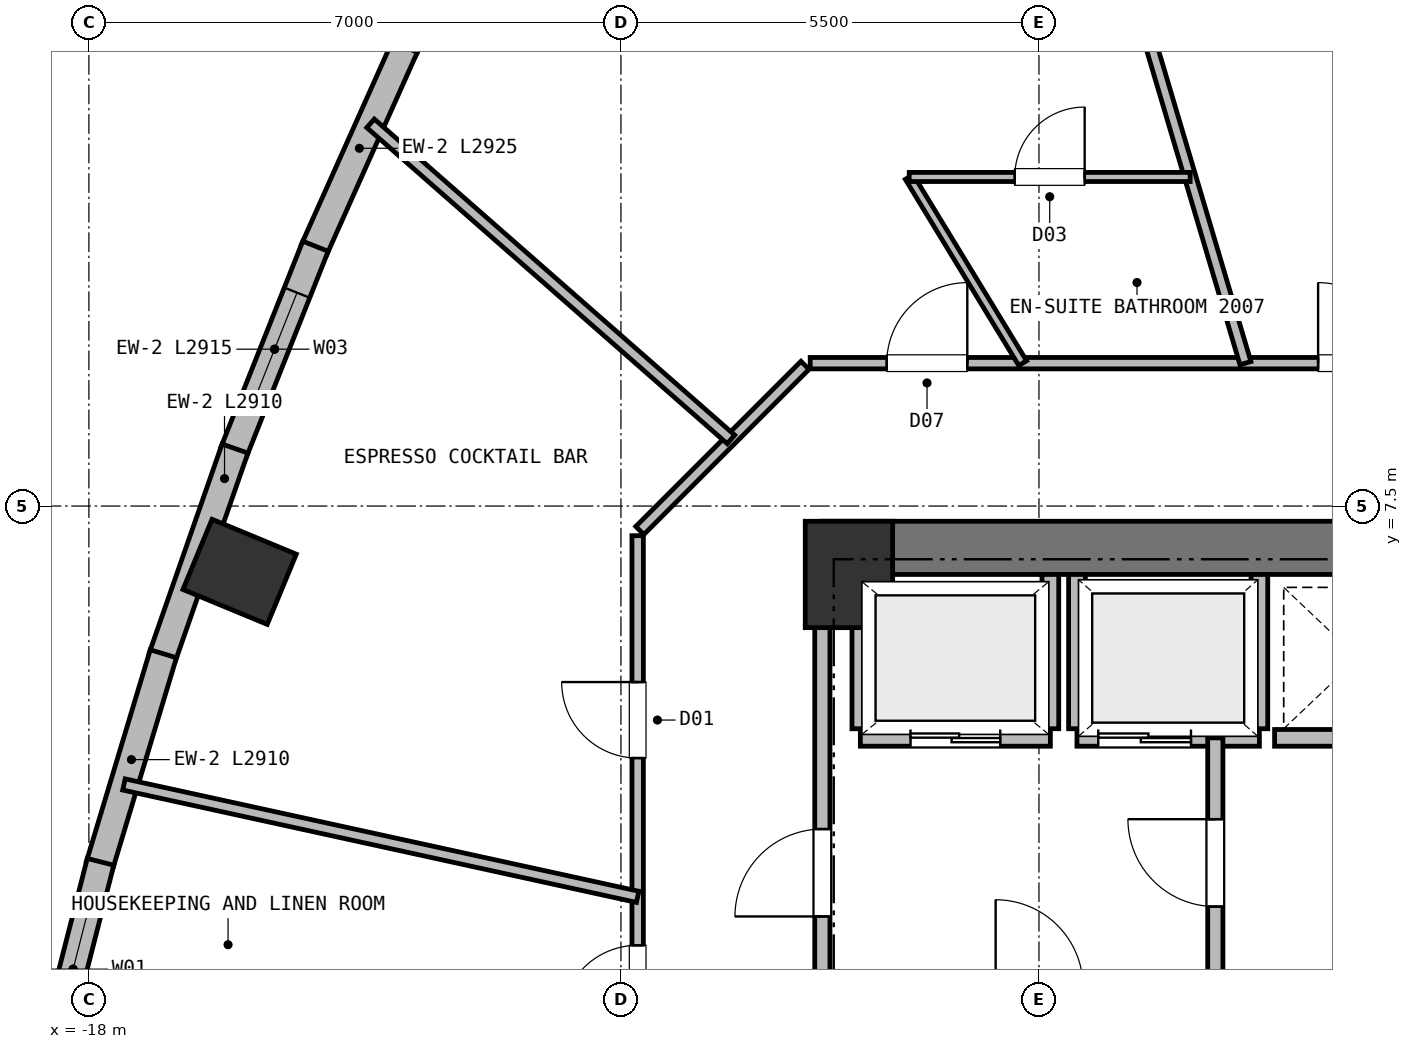
"""IFC4 building model, lengths in metres.
Left out: names, types, materials, properties, quantities, classifications, styles, units other than length and angle.
Written with IfcOpenShell. Run it as: python <this file> out.ifc"""

import sys

from ifc_helpers import new_model, si_unit, direction, frame, frame_2d, origin, origin_2d, place, context, subcontext, project, spatial, rectangle, extrude, element, fill, save


model = new_model("IFC4")
c1 = context("Model", 3, precision=1e-05, world=origin(), true_north=direction((0.0, 1.0)))
c2 = subcontext(c1, "Body", "Model", "MODEL_VIEW")
j1 = project(units=[si_unit("LENGTHUNIT", "METRE"), si_unit("PLANEANGLEUNIT", "RADIAN")], contexts=[c1])
p1 = place(None, origin())
s1 = spatial("IfcSite", under=j1, at=p1, CompositionType="ELEMENT")
p2 = place(p1, origin())
s2 = spatial("IfcBuilding", under=s1, at=p2, CompositionType="ELEMENT")
p3 = place(p2, frame((0.0, 0.0, 71.75)))
s3 = spatial("IfcBuildingStorey", under=s2, at=p3, CompositionType="ELEMENT", Elevation=71.75)
p4 = place(p3, frame((-8.0, 6.6, 0.0), z_axis=(0.0, 0.0, 1.0), x_axis=(1.0, 0.0, 0.0)))
e1 = element("IfcColumn", 1, at=p4, inside=s3, PredefinedType="COLUMN", context=c2, shape_type="SweptSolid", body=[
    extrude(rectangle(XDim=1.15, YDim=1.4, at=origin_2d()), origin(), (0.0, 0.0, 1.0), 3.75),
])
p5 = place(p3, frame((-8.35, 6.95, 0.0), z_axis=(0.0, 0.0, 1.0), x_axis=(1.0, 0.0, 0.0)))
e2 = element("IfcWall", 2, at=p5, inside=s3, PredefinedType="SHEAR", context=c2, shape_type="SweptSolid", body=[
    extrude(rectangle(XDim=16.7, YDim=0.7, at=frame_2d((8.35, 0.0))), origin(), (0.0, 0.0, 1.0), 3.5),
])
p6 = place(p3, frame((-16.017, 6.635, 0.0), z_axis=(0.0, 0.0, 1.0), x_axis=(0.382683432365, 0.923879532511, 0.0)))
e3 = element("IfcColumn", 3, at=p6, inside=s3, PredefinedType="COLUMN", context=c2, shape_type="SweptSolid", body=[
    extrude(rectangle(XDim=1.0, YDim=1.2, at=origin_2d()), origin(), (0.0, 0.0, 1.0), 3.75),
])
p7 = place(p3, frame((-13.865, 13.498, 0.0), z_axis=(0.0, 0.0, 1.0), x_axis=(0.446383231338, 0.894841891499, 0.0)))
e4 = element("IfcWall", 4, at=p7, inside=s3, PredefinedType="SOLIDWALL", context=c2, shape_type="SweptSolid", body=[
    extrude(rectangle(XDim=2.941, YDim=0.36, at=frame_2d((1.47, 0.0))), origin(), (0.0, 0.0, 1.0), 3.5),
])
p8 = place(p7, frame((0.67, 0.0, 0.72)))
e5 = element("IfcOpeningElement", 5, at=p8, cuts=e4, PredefinedType="OPENING", context=c2, shape_type="SweptSolid", body=[
    extrude(rectangle(XDim=1.6, YDim=1.88, at=frame_2d((0.8, 0.94))), frame((0.0, 0.19, 0.0), z_axis=(0.0, -1.0, 0.0), x_axis=(1.0, 0.0, 0.0)), (0.0, 0.0, 1.0), 0.38),
])
p9 = place(p3, frame((-15.038, 10.873, 0.0), z_axis=(0.0, 0.0, 1.0), x_axis=(0.408305664589, 0.912845268523, 0.0)))
e6 = element("IfcWall", 6, at=p9, inside=s3, PredefinedType="SOLIDWALL", context=c2, shape_type="SweptSolid", body=[
    extrude(rectangle(XDim=2.925, YDim=0.36, at=frame_2d((1.462, 0.0))), origin(), (0.0, 0.0, 1.0), 3.5),
])
p10 = place(p3, frame((-16.095, 8.21, 0.0), z_axis=(0.0, 0.0, 1.0), x_axis=(0.369223403916, 0.929340668432, 0.0)))
e7 = element("IfcWall", 7, at=p10, inside=s3, PredefinedType="SOLIDWALL", context=c2, shape_type="SweptSolid", body=[
    extrude(rectangle(XDim=2.915, YDim=0.36, at=frame_2d((1.458, 0.0))), origin(), (0.0, 0.0, 1.0), 3.5),
])
p11 = place(p10, frame((0.657, 0.0, 0.72)))
e8 = element("IfcOpeningElement", 8, at=p11, cuts=e7, PredefinedType="OPENING", context=c2, shape_type="SweptSolid", body=[
    extrude(rectangle(XDim=1.6, YDim=1.88, at=frame_2d((0.8, 0.94))), frame((0.0, 0.19, 0.0), z_axis=(0.0, -1.0, 0.0), x_axis=(1.0, 0.0, 0.0)), (0.0, 0.0, 1.0), 0.38),
])
p12 = place(p3, frame((-17.036, 5.509, 0.0), z_axis=(0.0, 0.0, 1.0), x_axis=(0.329262553332, 0.944238407911, 0.0)))
e9 = element("IfcWall", 9, at=p12, inside=s3, PredefinedType="SOLIDWALL", context=c2, shape_type="SweptSolid", body=[
    extrude(rectangle(XDim=2.91, YDim=0.36, at=frame_2d((1.455, 0.0))), origin(), (0.0, 0.0, 1.0), 3.5),
])
p13 = place(p3, frame((-17.86, 2.771, 0.0), z_axis=(0.0, 0.0, 1.0), x_axis=(0.288579409527, 0.95745596473, 0.0)))
e10 = element("IfcWall", 10, at=p13, inside=s3, PredefinedType="SOLIDWALL", context=c2, shape_type="SweptSolid", body=[
    extrude(rectangle(XDim=2.909, YDim=0.36, at=frame_2d((1.455, 0.0))), origin(), (0.0, 0.0, 1.0), 3.5),
])
p14 = place(p3, frame((-18.568, -0.005, 0.0), z_axis=(0.0, 0.0, 1.0), x_axis=(0.247577302221, 0.968868143467, 0.0)))
e11 = element("IfcWall", 11, at=p14, inside=s3, PredefinedType="SOLIDWALL", context=c2, shape_type="SweptSolid", body=[
    extrude(rectangle(XDim=2.915, YDim=0.36, at=frame_2d((1.458, 0.0))), origin(), (0.0, 0.0, 1.0), 3.5),
])
p15 = place(p14, frame((0.657, 0.0, 0.72)))
e12 = element("IfcOpeningElement", 12, at=p15, cuts=e11, PredefinedType="OPENING", context=c2, shape_type="SweptSolid", body=[
    extrude(rectangle(XDim=1.6, YDim=1.88, at=frame_2d((0.8, 0.94))), frame((0.0, 0.19, 0.0), z_axis=(0.0, -1.0, 0.0), x_axis=(1.0, 0.0, 0.0)), (0.0, 0.0, 1.0), 0.38),
])
p16 = place(p3, frame((-7.85, 4.45, 0.0), z_axis=(0.0, 0.0, 1.0), x_axis=(1.0, 0.0, 0.0)))
e13 = element("IfcWall", 13, at=p16, inside=s3, PredefinedType="PARTITIONING", context=c2, shape_type="SweptSolid", body=[
    extrude(rectangle(XDim=2.5, YDim=0.22, at=frame_2d((1.25, 0.0))), origin(), (0.0, 0.0, 1.0), 3.5),
])
p17 = place(p16, frame((0.66, 0.0, 0.0)))
e14 = element("IfcOpeningElement", 14, at=p17, cuts=e13, PredefinedType="OPENING", context=c2, shape_type="SweptSolid", body=[
    extrude(rectangle(XDim=1.18, YDim=2.15, at=frame_2d((0.59, 1.075))), frame((0.0, 0.12, 0.0), z_axis=(0.0, -1.0, 0.0), x_axis=(1.0, 0.0, 0.0)), (0.0, 0.0, 1.0), 0.24),
])
p18 = place(p3, frame((-7.85, 4.57, 0.0), z_axis=(0.0, 0.0, 1.0), x_axis=(0.0, 1.0, 0.0)))
e15 = element("IfcWall", 15, at=p18, inside=s3, PredefinedType="PARTITIONING", context=c2, shape_type="SweptSolid", body=[
    extrude(rectangle(XDim=2.03, YDim=0.22, at=frame_2d((1.015, 0.0))), origin(), (0.0, 0.0, 1.0), 3.08),
])
p19 = place(p3, frame((-5.35, 4.57, 0.0), z_axis=(0.0, 0.0, 1.0), x_axis=(0.0, 1.0, 0.0)))
e16 = element("IfcWall", 16, at=p19, inside=s3, PredefinedType="PARTITIONING", context=c2, shape_type="SweptSolid", body=[
    extrude(rectangle(XDim=2.03, YDim=0.22, at=frame_2d((1.015, 0.0))), origin(), (0.0, 0.0, 1.0), 3.5),
])
p20 = place(p3, frame((-5.0, 4.45, 0.0), z_axis=(0.0, 0.0, 1.0), x_axis=(1.0, 0.0, 0.0)))
e17 = element("IfcWall", 17, at=p20, inside=s3, PredefinedType="PARTITIONING", context=c2, shape_type="SweptSolid", body=[
    extrude(rectangle(XDim=2.4, YDim=0.22, at=frame_2d((1.2, 0.0))), origin(), (0.0, 0.0, 1.0), 3.5),
])
p21 = place(p20, frame((0.28, 0.0, 0.0)))
e18 = element("IfcOpeningElement", 18, at=p21, cuts=e17, PredefinedType="OPENING", context=c2, shape_type="SweptSolid", body=[
    extrude(rectangle(XDim=1.22, YDim=2.15, at=frame_2d((0.61, 1.075))), frame((0.0, 0.12, 0.0), z_axis=(0.0, -1.0, 0.0), x_axis=(1.0, 0.0, 0.0)), (0.0, 0.0, 1.0), 0.24),
])
for number, where, z_axis, x_axis in (
    (19, (-5.0, 4.57, 0.0), (0.0, 0.0, 1.0), (0.0, 1.0, 0.0)),
    (20, (-2.6, 4.57, 0.0), (0.0, 0.0, 1.0), (0.0, 1.0, 0.0)),
):
    element("IfcWall", number, at=place(p3, frame(where, z_axis=z_axis, x_axis=x_axis)), inside=s3, PredefinedType="PARTITIONING", context=c2, shape_type="SweptSolid", body=[
        extrude(rectangle(XDim=2.03, YDim=0.22, at=frame_2d((1.015, 0.0))), origin(), (0.0, 0.0, 1.0), 3.5),
    ])
p22 = place(p3, frame((-2.4, 4.45, 0.0), z_axis=(0.0, 0.0, 1.0), x_axis=(1.0, 0.0, 0.0)))
e21 = element("IfcWall", 21, at=p22, inside=s3, PredefinedType="PARTITIONING", context=c2, shape_type="SweptSolid", body=[
    extrude(rectangle(XDim=2.2, YDim=0.22, at=frame_2d((1.1, 0.0))), origin(), (0.0, 0.0, 1.0), 3.5),
])
p23 = place(p3, frame((-3.18, 1.15, 0.0), z_axis=(0.0, 0.0, 1.0), x_axis=(0.0, 1.0, 0.0)))
e22 = element("IfcWall", 22, at=p23, inside=s3, PredefinedType="PARTITIONING", context=c2, shape_type="SweptSolid", body=[
    extrude(rectangle(XDim=3.3, YDim=0.2, at=frame_2d((1.65, 0.0))), origin(), (0.0, 0.0, 1.0), 3.5),
])
p24 = place(p23, frame((1.08, 0.0, 0.0)))
e23 = element("IfcOpeningElement", 23, at=p24, cuts=e22, PredefinedType="OPENING", context=c2, shape_type="SweptSolid", body=[
    extrude(rectangle(XDim=1.15, YDim=2.15, at=frame_2d((0.575, 1.075))), frame((0.0, 0.11, 0.0), z_axis=(0.0, -1.0, 0.0), x_axis=(1.0, 0.0, 0.0)), (0.0, 0.0, 1.0), 0.22),
])
p25 = place(p3, frame((-8.35, 1.15, 0.0), z_axis=(0.0, 0.0, 1.0), x_axis=(0.0, 1.0, 0.0)))
e24 = element("IfcWall", 24, at=p25, inside=s3, PredefinedType="PARTITIONING", context=c2, shape_type="SweptSolid", body=[
    extrude(rectangle(XDim=5.4, YDim=0.2, at=frame_2d((2.7, 0.0))), origin(), (0.0, 0.0, 1.0), 3.5),
])
p26 = place(p25, frame((0.95, 0.0, 0.0)))
e25 = element("IfcOpeningElement", 25, at=p26, cuts=e24, PredefinedType="OPENING", context=c2, shape_type="SweptSolid", body=[
    extrude(rectangle(XDim=1.15, YDim=2.15, at=frame_2d((0.575, 1.075))), frame((0.0, 0.11, 0.0), z_axis=(0.0, -1.0, 0.0), x_axis=(1.0, 0.0, 0.0)), (0.0, 0.0, 1.0), 0.22),
])
p27 = place(p3, frame((-8.51, 9.38, 0.0), z_axis=(0.0, 0.0, 1.0), x_axis=(1.0, 0.0, 0.0)))
e26 = element("IfcWall", 26, at=p27, inside=s3, PredefinedType="PARTITIONING", context=c2, shape_type="SweptSolid", body=[
    extrude(rectangle(XDim=17.02, YDim=0.15, at=frame_2d((8.51, 0.0))), origin(), (0.0, 0.0, 1.0), 3.5),
])
p28 = place(p27, frame((12.398, 0.0, 0.0)))
e27 = element("IfcOpeningElement", 27, at=p28, cuts=e26, PredefinedType="OPENING", context=c2, shape_type="SweptSolid", body=[
    extrude(rectangle(XDim=1.06, YDim=2.15, at=frame_2d((0.53, 1.075))), frame((0.0, 0.085, 0.0), z_axis=(0.0, -1.0, 0.0), x_axis=(1.0, 0.0, 0.0)), (0.0, 0.0, 1.0), 0.17),
])
p29 = place(p27, frame((1.007, 0.0, 0.0)))
e28 = element("IfcOpeningElement", 28, at=p29, cuts=e26, PredefinedType="OPENING", context=c2, shape_type="SweptSolid", body=[
    extrude(rectangle(XDim=1.06, YDim=2.15, at=frame_2d((0.53, 1.075))), frame((0.0, 0.085, 0.0), z_axis=(0.0, -1.0, 0.0), x_axis=(1.0, 0.0, 0.0)), (0.0, 0.0, 1.0), 0.17),
])
p30 = place(p27, frame((6.683, 0.0, 0.0)))
e29 = element("IfcOpeningElement", 29, at=p30, cuts=e26, PredefinedType="OPENING", context=c2, shape_type="SweptSolid", body=[
    extrude(rectangle(XDim=1.06, YDim=2.15, at=frame_2d((0.53, 1.075))), frame((0.0, 0.085, 0.0), z_axis=(0.0, -1.0, 0.0), x_axis=(1.0, 0.0, 0.0)), (0.0, 0.0, 1.0), 0.17),
])
p31 = place(p3, frame((-10.752, 7.178, 0.0), z_axis=(0.0, 0.0, 1.0), x_axis=(0.707067066127, 0.707146494016, 0.0)))
e30 = element("IfcWall", 30, at=p31, inside=s3, PredefinedType="PARTITIONING", context=c2, shape_type="SweptSolid", body=[
    extrude(rectangle(XDim=3.074, YDim=0.15, at=frame_2d((1.537, 0.0))), origin(), (0.0, 0.0, 1.0), 3.5),
])
p32 = place(p3, frame((-10.78, -7.11, 0.0), z_axis=(0.0, 0.0, 1.0), x_axis=(0.0, 1.0, 0.0)))
e31 = element("IfcWall", 31, at=p32, inside=s3, PredefinedType="PARTITIONING", context=c2, shape_type="SweptSolid", body=[
    extrude(rectangle(XDim=14.22, YDim=0.15, at=frame_2d((7.11, 0.0))), origin(), (0.0, 0.0, 1.0), 3.12),
])
p33 = place(p32, frame((5.471, 0.0, 0.0)))
e32 = element("IfcOpeningElement", 32, at=p33, cuts=e31, PredefinedType="OPENING", context=c2, shape_type="SweptSolid", body=[
    extrude(rectangle(XDim=0.95, YDim=2.1, at=frame_2d((0.475, 1.05))), frame((0.0, 0.085, 0.0), z_axis=(0.0, -1.0, 0.0), x_axis=(1.0, 0.0, 0.0)), (0.0, 0.0, 1.0), 0.17),
])
p34 = place(p32, frame((7.83, 0.0, 0.0)))
e33 = element("IfcOpeningElement", 33, at=p34, cuts=e31, PredefinedType="OPENING", context=c2, shape_type="SweptSolid", body=[
    extrude(rectangle(XDim=1.0, YDim=2.15, at=frame_2d((0.5, 1.075))), frame((0.0, 0.085, 0.0), z_axis=(0.0, -1.0, 0.0), x_axis=(1.0, 0.0, 0.0)), (0.0, 0.0, 1.0), 0.17),
])
p35 = place(p32, frame((11.294, 0.0, 0.0)))
e34 = element("IfcOpeningElement", 34, at=p35, cuts=e31, PredefinedType="OPENING", context=c2, shape_type="SweptSolid", body=[
    extrude(rectangle(XDim=1.0, YDim=2.15, at=frame_2d((0.5, 1.075))), frame((0.0, 0.085, 0.0), z_axis=(0.0, -1.0, 0.0), x_axis=(1.0, 0.0, 0.0)), (0.0, 0.0, 1.0), 0.17),
])
p36 = place(p32, frame((0.14, 0.0, 0.0)))
e35 = element("IfcOpeningElement", 35, at=p36, cuts=e31, PredefinedType="OPENING", context=c2, shape_type="SweptSolid", body=[
    extrude(rectangle(XDim=1.06, YDim=2.15, at=frame_2d((0.53, 1.075))), frame((0.0, 0.085, 0.0), z_axis=(0.0, -1.0, 0.0), x_axis=(1.0, 0.0, 0.0)), (0.0, 0.0, 1.0), 0.17),
])
p37 = place(p3, frame((-2.783, 9.38, 0.0), z_axis=(0.0, 0.0, 1.0), x_axis=(-0.284496959379, 0.958676942512, 0.0)))
e36 = element("IfcWall", 36, at=p37, inside=s3, PredefinedType="PARTITIONING", context=c2, shape_type="SweptSolid", body=[
    extrude(rectangle(XDim=15.5, YDim=0.15, at=frame_2d((7.75, 0.0))), origin(), (0.0, 0.0, 1.0), 3.5),
])
p38 = place(p3, frame((-7.207, 11.83, 0.0), z_axis=(0.0, 0.0, 1.0), x_axis=(0.520203390889, -0.854042406504, 0.0)))
e37 = element("IfcWall", 37, at=p38, inside=s3, PredefinedType="PARTITIONING", context=c2, shape_type="SweptSolid", body=[
    extrude(rectangle(XDim=2.869, YDim=0.12, at=frame_2d((1.435, 0.0))), origin(), (0.0, 0.0, 1.0), 3.5),
])
p39 = place(p3, frame((-7.207, 11.83, 0.0), z_axis=(0.0, 0.0, 1.0), x_axis=(1.0, 0.0, 0.0)))
e38 = element("IfcWall", 38, at=p39, inside=s3, PredefinedType="PARTITIONING", context=c2, shape_type="SweptSolid", body=[
    extrude(rectangle(XDim=3.696, YDim=0.12, at=frame_2d((1.848, 0.0))), origin(), (0.0, 0.0, 1.0), 3.5),
])
p40 = place(p39, frame((1.388, 0.0, 0.0)))
e39 = element("IfcOpeningElement", 39, at=p40, cuts=e38, PredefinedType="OPENING", context=c2, shape_type="SweptSolid", body=[
    extrude(rectangle(XDim=0.92, YDim=2.1, at=frame_2d((0.46, 1.05))), frame((0.0, 0.07, 0.0), z_axis=(0.0, -1.0, 0.0), x_axis=(1.0, 0.0, 0.0)), (0.0, 0.0, 1.0), 0.14),
])
p41 = place(p3, frame((-9.552, 8.377, 0.0), z_axis=(0.0, 0.0, 1.0), x_axis=(-0.751832839007, 0.659353761034, 0.0)))
e40 = element("IfcWall", 40, at=p41, inside=s3, PredefinedType="PARTITIONING", context=c2, shape_type="SweptSolid", body=[
    extrude(rectangle(XDim=6.307, YDim=0.15, at=frame_2d((3.153, 0.0))), origin(), (0.0, 0.0, 1.0), 3.5),
])
p42 = place(p3, frame((-10.78, 2.358, 0.0), z_axis=(0.0, 0.0, 1.0), x_axis=(-0.97689172926, 0.213734763911, 0.0)))
e41 = element("IfcWall", 41, at=p42, inside=s3, PredefinedType="PARTITIONING", context=c2, shape_type="SweptSolid", body=[
    extrude(rectangle(XDim=6.919, YDim=0.15, at=frame_2d((3.459, 0.0))), origin(), (0.0, 0.0, 1.0), 3.5),
])
p43 = place(p11, origin())
e42 = element("IfcWindow", 42, at=p43, inside=s3, PartitioningType="SINGLE_PANEL", PredefinedType="WINDOW", context=c2, shape_type="SweptSolid", body=[
    extrude(rectangle(XDim=1.6, YDim=1.88, at=frame_2d((0.8, 0.94))), frame((0.0, 0.03, 0.0), z_axis=(0.0, -1.0, 0.0), x_axis=(1.0, 0.0, 0.0)), (0.0, 0.0, 1.0), 0.06),
])
fill(e8, e42)
p44 = place(p15, origin())
e43 = element("IfcWindow", 43, at=p44, inside=s3, PartitioningType="SINGLE_PANEL", PredefinedType="WINDOW", context=c2, shape_type="SweptSolid", body=[
    extrude(rectangle(XDim=1.6, YDim=1.88, at=frame_2d((0.8, 0.94))), frame((0.0, 0.03, 0.0), z_axis=(0.0, -1.0, 0.0), x_axis=(1.0, 0.0, 0.0)), (0.0, 0.0, 1.0), 0.06),
])
fill(e12, e43)
p45 = place(p17, origin())
e44 = element("IfcDoor", 44, at=p45, inside=s3, OperationType="DOUBLE_DOOR_SLIDING", PredefinedType="DOOR", context=c2, shape_type="SweptSolid", body=[
    extrude(rectangle(XDim=1.18, YDim=2.15, at=frame_2d((0.59, 1.075))), frame((0.0, 0.025, 0.0), z_axis=(0.0, -1.0, 0.0), x_axis=(1.0, 0.0, 0.0)), (0.0, 0.0, 1.0), 0.05),
])
fill(e14, e44)
p46 = place(p21, origin())
e45 = element("IfcDoor", 45, at=p46, inside=s3, OperationType="DOUBLE_DOOR_SLIDING", PredefinedType="DOOR", context=c2, shape_type="SweptSolid", body=[
    extrude(rectangle(XDim=1.22, YDim=2.15, at=frame_2d((0.61, 1.075))), frame((0.0, 0.025, 0.0), z_axis=(0.0, -1.0, 0.0), x_axis=(1.0, 0.0, 0.0)), (0.0, 0.0, 1.0), 0.05),
])
fill(e18, e45)
p47 = place(p24, origin())
e46 = element("IfcDoor", 46, at=p47, inside=s3, OperationType="SINGLE_SWING_RIGHT", PredefinedType="DOOR", context=c2, shape_type="SweptSolid", body=[
    extrude(rectangle(XDim=1.15, YDim=2.15, at=frame_2d((0.575, 1.075))), frame((0.0, 0.025, 0.0), z_axis=(0.0, -1.0, 0.0), x_axis=(1.0, 0.0, 0.0)), (0.0, 0.0, 1.0), 0.05),
])
fill(e23, e46)
p48 = place(p26, origin())
e47 = element("IfcDoor", 47, at=p48, inside=s3, OperationType="SINGLE_SWING_LEFT", PredefinedType="DOOR", context=c2, shape_type="SweptSolid", body=[
    extrude(rectangle(XDim=1.15, YDim=2.15, at=frame_2d((0.575, 1.075))), frame((0.0, 0.025, 0.0), z_axis=(0.0, -1.0, 0.0), x_axis=(1.0, 0.0, 0.0)), (0.0, 0.0, 1.0), 0.05),
])
fill(e25, e47)
p49 = place(p40, origin())
e48 = element("IfcDoor", 48, at=p49, inside=s3, OperationType="SINGLE_SWING_RIGHT", PredefinedType="DOOR", context=c2, shape_type="SweptSolid", body=[
    extrude(rectangle(XDim=0.92, YDim=2.1, at=frame_2d((0.46, 1.05))), frame((0.0, 0.025, 0.0), z_axis=(0.0, -1.0, 0.0), x_axis=(1.0, 0.0, 0.0)), (0.0, 0.0, 1.0), 0.05),
])
fill(e39, e48)
p50 = place(p34, origin())
e49 = element("IfcDoor", 49, at=p50, inside=s3, OperationType="SINGLE_SWING_LEFT", PredefinedType="DOOR", context=c2, shape_type="SweptSolid", body=[
    extrude(rectangle(XDim=1.0, YDim=2.15, at=frame_2d((0.5, 1.075))), frame((0.0, 0.025, 0.0), z_axis=(0.0, -1.0, 0.0), x_axis=(1.0, 0.0, 0.0)), (0.0, 0.0, 1.0), 0.05),
])
fill(e33, e49)
p51 = place(p35, origin())
e50 = element("IfcDoor", 50, at=p51, inside=s3, OperationType="SINGLE_SWING_RIGHT", PredefinedType="DOOR", context=c2, shape_type="SweptSolid", body=[
    extrude(rectangle(XDim=1.0, YDim=2.15, at=frame_2d((0.5, 1.075))), frame((0.0, 0.025, 0.0), z_axis=(0.0, -1.0, 0.0), x_axis=(1.0, 0.0, 0.0)), (0.0, 0.0, 1.0), 0.05),
])
fill(e34, e50)
p52 = place(p29, origin())
e51 = element("IfcDoor", 51, at=p52, inside=s3, OperationType="SINGLE_SWING_RIGHT", PredefinedType="DOOR", context=c2, shape_type="SweptSolid", body=[
    extrude(rectangle(XDim=1.06, YDim=2.15, at=frame_2d((0.53, 1.075))), frame((0.0, 0.025, 0.0), z_axis=(0.0, -1.0, 0.0), x_axis=(1.0, 0.0, 0.0)), (0.0, 0.0, 1.0), 0.05),
])
fill(e28, e51)
p53 = place(p30, origin())
e52 = element("IfcDoor", 52, at=p53, inside=s3, OperationType="SINGLE_SWING_LEFT", PredefinedType="DOOR", context=c2, shape_type="SweptSolid", body=[
    extrude(rectangle(XDim=1.06, YDim=2.15, at=frame_2d((0.53, 1.075))), frame((0.0, 0.025, 0.0), z_axis=(0.0, -1.0, 0.0), x_axis=(1.0, 0.0, 0.0)), (0.0, 0.0, 1.0), 0.05),
])
fill(e29, e52)
save(model, sys.argv[1])
